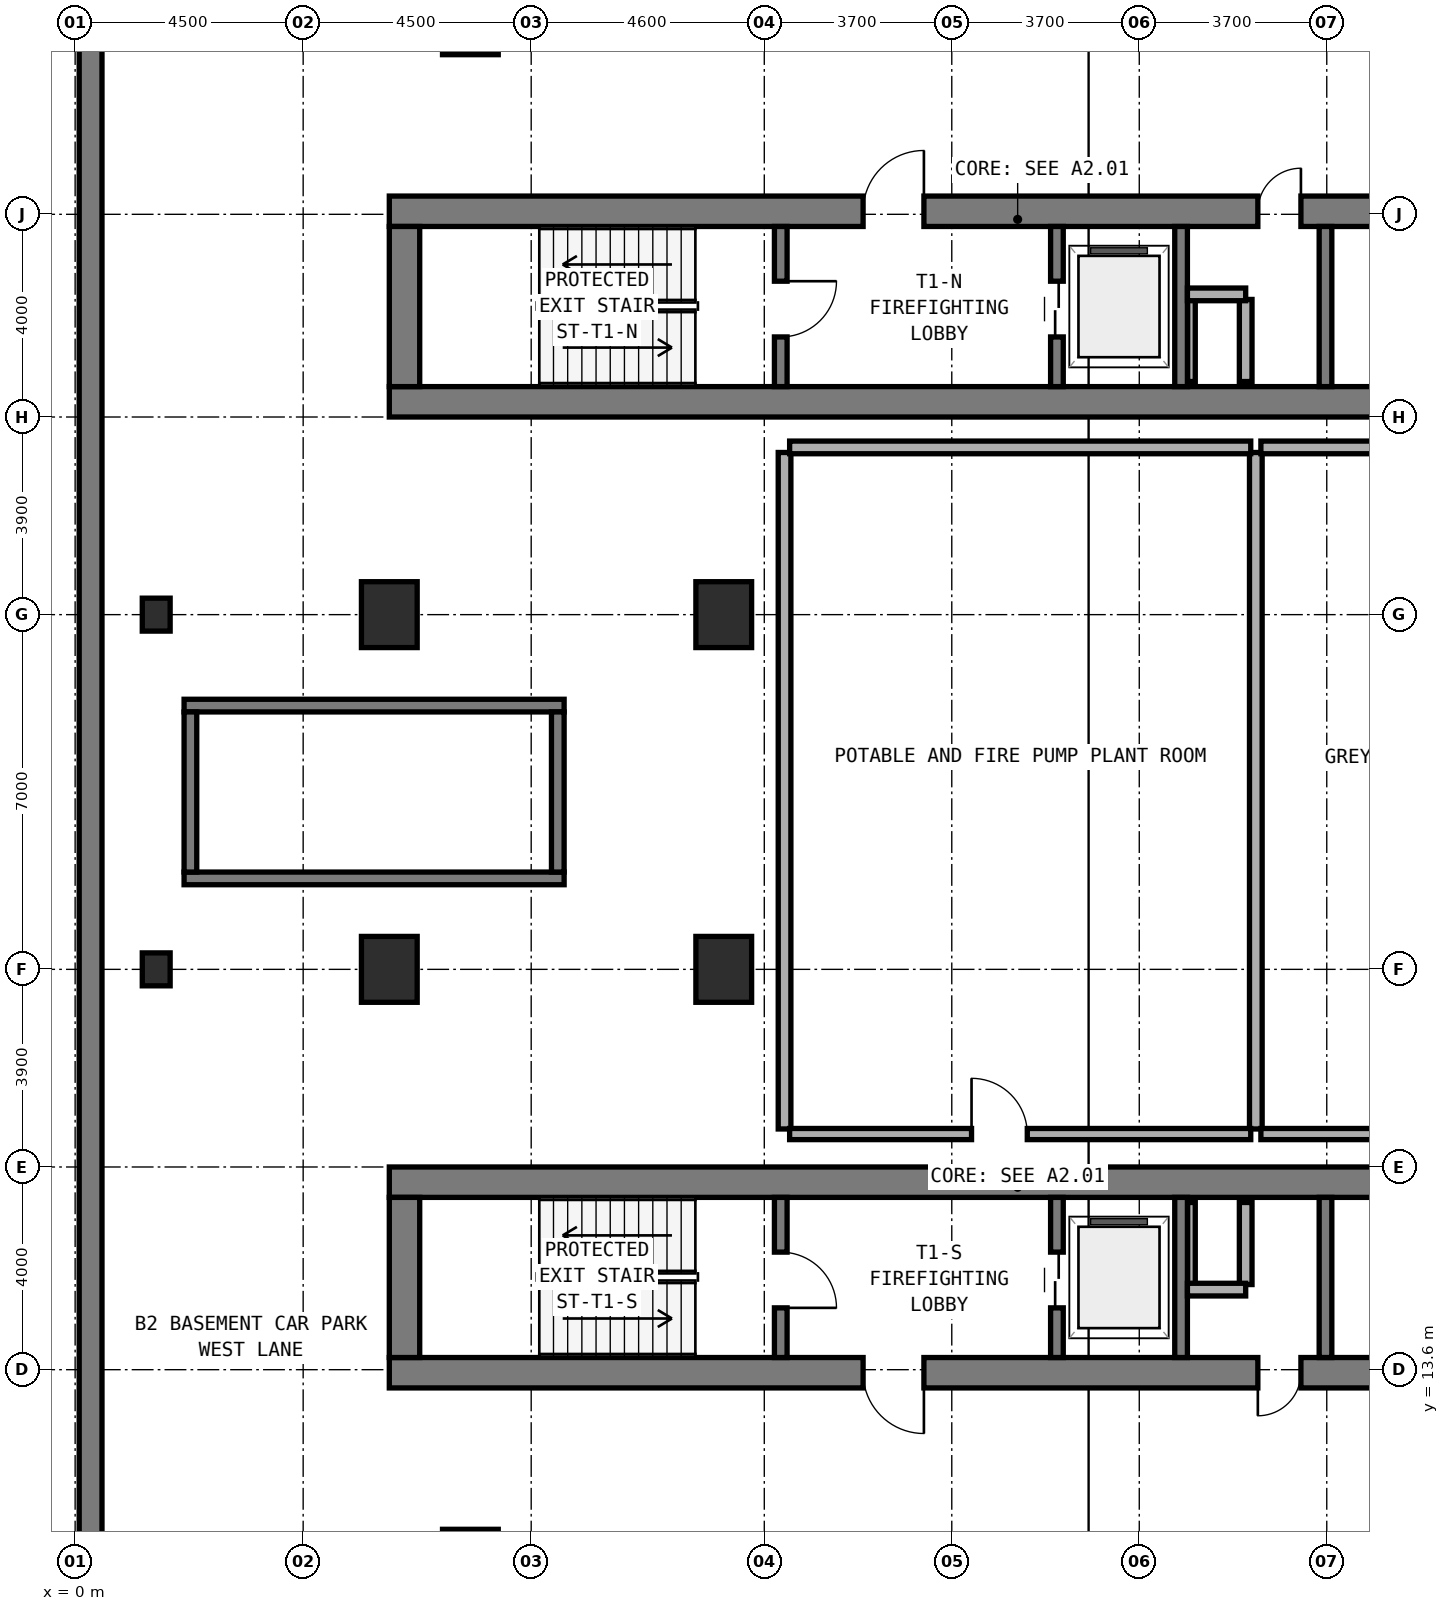
"""IFC4 building model, lengths in metres.
Left out: names, types, materials, properties, quantities, classifications, styles, units other than length and angle.
Written with IfcOpenShell. Run it as: python <this file> out.ifc"""

import sys

from ifc_helpers import new_model, si_unit, direction, frame, frame_2d, origin, origin_2d, place, context, subcontext, project, spatial, rectangle, extrude, element, fill, save


model = new_model("IFC4")
c1 = context("Model", 3, precision=1e-05, world=origin(), true_north=direction((0.0, 1.0)))
c2 = subcontext(c1, "Body", "Model", "MODEL_VIEW")
j1 = project(units=[si_unit("LENGTHUNIT", "METRE"), si_unit("PLANEANGLEUNIT", "RADIAN")], contexts=[c1])
p1 = place(None, origin())
s1 = spatial("IfcSite", under=j1, at=p1, CompositionType="ELEMENT")
p2 = place(p1, origin())
s2 = spatial("IfcBuilding", under=s1, at=p2, CompositionType="ELEMENT")
p3 = place(p2, frame((0.0, 0.0, -8.4)))
s3 = spatial("IfcBuildingStorey", under=s2, at=p3, CompositionType="ELEMENT", Elevation=-8.4)
p4 = place(p3, frame((0.305, 49.47, 0.0), z_axis=(0.0, 0.0, 1.0), x_axis=(0.0, -1.0, 0.0)))
e1 = element("IfcWall", 1, at=p4, inside=s3, PredefinedType="USERDEFINED", context=c2, shape_type="SweptSolid", body=[
    extrude(rectangle(XDim=48.94, YDim=0.45, at=frame_2d((24.47, 0.0))), origin(), (0.0, 0.0, 1.0), 4.2),
])
p5 = place(p3, frame((6.2, 32.7, 0.0), z_axis=(0.0, 0.0, 1.0), x_axis=(1.0, 0.0, 0.0)))
e2 = element("IfcWall", 2, at=p5, inside=s3, PredefinedType="SHEAR", context=c2, shape_type="SweptSolid", body=[
    extrude(rectangle(XDim=24.8, YDim=0.6, at=frame_2d((12.4, 0.0))), origin(), (0.0, 0.0, 1.0), 4.2),
])
p6 = place(p3, frame((6.2, 36.46, 0.0), z_axis=(0.0, 0.0, 1.0), x_axis=(1.0, 0.0, 0.0)))
e3 = element("IfcWall", 3, at=p6, inside=s3, PredefinedType="SHEAR", context=c2, shape_type="SweptSolid", body=[
    extrude(rectangle(XDim=24.8, YDim=0.6, at=frame_2d((12.4, 0.0))), origin(), (0.0, 0.0, 1.0), 4.2),
])
p7 = place(p6, frame((9.35, 0.0, 0.0)))
e4 = element("IfcOpeningElement", 4, at=p7, cuts=e3, PredefinedType="OPENING", context=c2, shape_type="SweptSolid", body=[
    extrude(rectangle(XDim=1.2, YDim=2.15, at=frame_2d((0.6, 1.075))), frame((0.0, 0.31, 0.0), z_axis=(0.0, -1.0, 0.0), x_axis=(1.0, 0.0, 0.0)), (0.0, 0.0, 1.0), 0.62),
])
p8 = place(p6, frame((17.14, 0.0, 0.0)))
e5 = element("IfcOpeningElement", 5, at=p8, cuts=e3, PredefinedType="OPENING", context=c2, shape_type="SweptSolid", body=[
    extrude(rectangle(XDim=0.85, YDim=2.1, at=frame_2d((0.425, 1.05))), frame((0.0, 0.31, 0.0), z_axis=(0.0, -1.0, 0.0), x_axis=(1.0, 0.0, 0.0)), (0.0, 0.0, 1.0), 0.62),
])
p9 = place(p3, frame((6.5, 33.0, 0.0), z_axis=(0.0, 0.0, 1.0), x_axis=(0.0, 1.0, 0.0)))
e6 = element("IfcWall", 6, at=p9, inside=s3, PredefinedType="SHEAR", context=c2, shape_type="SweptSolid", body=[
    extrude(rectangle(XDim=3.16, YDim=0.6, at=frame_2d((1.58, 0.0))), origin(), (0.0, 0.0, 1.0), 4.2),
])
p10 = place(p3, frame((13.925, 33.0, 0.0), z_axis=(0.0, 0.0, 1.0), x_axis=(0.0, 1.0, 0.0)))
e7 = element("IfcWall", 7, at=p10, inside=s3, PredefinedType="STANDARD", context=c2, shape_type="SweptSolid", body=[
    extrude(rectangle(XDim=3.16, YDim=0.25, at=frame_2d((1.58, 0.0))), origin(), (0.0, 0.0, 1.0), 3.88),
])
p11 = place(p10, frame((0.98, 0.0, 0.0)))
e8 = element("IfcOpeningElement", 8, at=p11, cuts=e7, PredefinedType="OPENING", context=c2, shape_type="SweptSolid", body=[
    extrude(rectangle(XDim=1.1, YDim=2.15, at=frame_2d((0.55, 1.075))), frame((0.0, 0.135, 0.0), z_axis=(0.0, -1.0, 0.0), x_axis=(1.0, 0.0, 0.0)), (0.0, 0.0, 1.0), 0.27),
])
p12 = place(p3, frame((19.375, 33.0, 0.0), z_axis=(0.0, 0.0, 1.0), x_axis=(0.0, 1.0, 0.0)))
e9 = element("IfcWall", 9, at=p12, inside=s3, PredefinedType="STANDARD", context=c2, shape_type="SweptSolid", body=[
    extrude(rectangle(XDim=3.16, YDim=0.25, at=frame_2d((1.58, 0.0))), origin(), (0.0, 0.0, 1.0), 3.88),
])
p13 = place(p12, frame((0.98, 0.0, 0.0)))
e10 = element("IfcOpeningElement", 10, at=p13, cuts=e9, PredefinedType="OPENING", context=c2, shape_type="SweptSolid", body=[
    extrude(rectangle(XDim=1.1, YDim=2.15, at=frame_2d((0.55, 1.075))), frame((0.0, 0.135, 0.0), z_axis=(0.0, -1.0, 0.0), x_axis=(1.0, 0.0, 0.0)), (0.0, 0.0, 1.0), 0.27),
])
for number, where, z_axis, x_axis in (
    (11, (21.825, 33.0, 0.0), (0.0, 0.0, 1.0), (0.0, 1.0, 0.0)),
    (12, (24.675, 33.0, 0.0), (0.0, 0.0, 1.0), (0.0, 1.0, 0.0)),
):
    element("IfcWall", number, at=place(p3, frame(where, z_axis=z_axis, x_axis=x_axis)), inside=s3, PredefinedType="STANDARD", context=c2, shape_type="SweptSolid", body=[
        extrude(rectangle(XDim=3.16, YDim=0.25, at=frame_2d((1.58, 0.0))), origin(), (0.0, 0.0, 1.0), 3.88),
    ])
p14 = place(p3, frame((6.2, 13.54, 0.0), z_axis=(0.0, 0.0, 1.0), x_axis=(1.0, 0.0, 0.0)))
e13 = element("IfcWall", 13, at=p14, inside=s3, PredefinedType="SHEAR", context=c2, shape_type="SweptSolid", body=[
    extrude(rectangle(XDim=24.8, YDim=0.6, at=frame_2d((12.4, 0.0))), origin(), (0.0, 0.0, 1.0), 4.2),
])
p15 = place(p14, frame((9.35, 0.0, 0.0)))
e14 = element("IfcOpeningElement", 14, at=p15, cuts=e13, PredefinedType="OPENING", context=c2, shape_type="SweptSolid", body=[
    extrude(rectangle(XDim=1.2, YDim=2.15, at=frame_2d((0.6, 1.075))), frame((0.0, 0.31, 0.0), z_axis=(0.0, -1.0, 0.0), x_axis=(1.0, 0.0, 0.0)), (0.0, 0.0, 1.0), 0.62),
])
p16 = place(p14, frame((17.14, 0.0, 0.0)))
e15 = element("IfcOpeningElement", 15, at=p16, cuts=e13, PredefinedType="OPENING", context=c2, shape_type="SweptSolid", body=[
    extrude(rectangle(XDim=0.85, YDim=2.1, at=frame_2d((0.425, 1.05))), frame((0.0, 0.31, 0.0), z_axis=(0.0, -1.0, 0.0), x_axis=(1.0, 0.0, 0.0)), (0.0, 0.0, 1.0), 0.62),
])
p17 = place(p3, frame((6.2, 17.3, 0.0), z_axis=(0.0, 0.0, 1.0), x_axis=(1.0, 0.0, 0.0)))
e16 = element("IfcWall", 16, at=p17, inside=s3, PredefinedType="SHEAR", context=c2, shape_type="SweptSolid", body=[
    extrude(rectangle(XDim=24.8, YDim=0.6, at=frame_2d((12.4, 0.0))), origin(), (0.0, 0.0, 1.0), 4.2),
])
p18 = place(p3, frame((6.5, 13.84, 0.0), z_axis=(0.0, 0.0, 1.0), x_axis=(0.0, 1.0, 0.0)))
e17 = element("IfcWall", 17, at=p18, inside=s3, PredefinedType="SHEAR", context=c2, shape_type="SweptSolid", body=[
    extrude(rectangle(XDim=3.16, YDim=0.6, at=frame_2d((1.58, 0.0))), origin(), (0.0, 0.0, 1.0), 4.2),
])
p19 = place(p3, frame((13.925, 13.84, 0.0), z_axis=(0.0, 0.0, 1.0), x_axis=(0.0, 1.0, 0.0)))
e18 = element("IfcWall", 18, at=p19, inside=s3, PredefinedType="STANDARD", context=c2, shape_type="SweptSolid", body=[
    extrude(rectangle(XDim=3.16, YDim=0.25, at=frame_2d((1.58, 0.0))), origin(), (0.0, 0.0, 1.0), 3.88),
])
p20 = place(p19, frame((0.98, 0.0, 0.0)))
e19 = element("IfcOpeningElement", 19, at=p20, cuts=e18, PredefinedType="OPENING", context=c2, shape_type="SweptSolid", body=[
    extrude(rectangle(XDim=1.1, YDim=2.15, at=frame_2d((0.55, 1.075))), frame((0.0, 0.135, 0.0), z_axis=(0.0, -1.0, 0.0), x_axis=(1.0, 0.0, 0.0)), (0.0, 0.0, 1.0), 0.27),
])
p21 = place(p3, frame((19.375, 13.84, 0.0), z_axis=(0.0, 0.0, 1.0), x_axis=(0.0, 1.0, 0.0)))
e20 = element("IfcWall", 20, at=p21, inside=s3, PredefinedType="STANDARD", context=c2, shape_type="SweptSolid", body=[
    extrude(rectangle(XDim=3.16, YDim=0.25, at=frame_2d((1.58, 0.0))), origin(), (0.0, 0.0, 1.0), 3.88),
])
p22 = place(p21, frame((0.98, 0.0, 0.0)))
e21 = element("IfcOpeningElement", 21, at=p22, cuts=e20, PredefinedType="OPENING", context=c2, shape_type="SweptSolid", body=[
    extrude(rectangle(XDim=1.1, YDim=2.15, at=frame_2d((0.55, 1.075))), frame((0.0, 0.135, 0.0), z_axis=(0.0, -1.0, 0.0), x_axis=(1.0, 0.0, 0.0)), (0.0, 0.0, 1.0), 0.27),
])
for number, where, z_axis, x_axis in (
    (22, (21.825, 13.84, 0.0), (0.0, 0.0, 1.0), (0.0, 1.0, 0.0)),
    (23, (24.675, 13.84, 0.0), (0.0, 0.0, 1.0), (0.0, 1.0, 0.0)),
):
    element("IfcWall", number, at=place(p3, frame(where, z_axis=z_axis, x_axis=x_axis)), inside=s3, PredefinedType="STANDARD", context=c2, shape_type="SweptSolid", body=[
        extrude(rectangle(XDim=3.16, YDim=0.25, at=frame_2d((1.58, 0.0))), origin(), (0.0, 0.0, 1.0), 3.88),
    ])
for number, where, z_axis, x_axis in (
    (24, (2.15, 23.295, 0.0), (0.0, 0.0, 1.0), (1.0, 0.0, 0.0)),
    (25, (2.15, 26.705, 0.0), (0.0, 0.0, 1.0), (1.0, 0.0, 0.0)),
):
    element("IfcWall", number, at=place(p3, frame(where, z_axis=z_axis, x_axis=x_axis)), inside=s3, PredefinedType="STANDARD", context=c2, shape_type="SweptSolid", body=[
        extrude(rectangle(XDim=7.5, YDim=0.25, at=frame_2d((3.75, 0.0))), origin(), (0.0, 0.0, 1.0), 4.2),
    ])
for number, where, z_axis, x_axis in (
    (26, (2.275, 23.42, 0.0), (0.0, 0.0, 1.0), (0.0, 1.0, 0.0)),
    (27, (9.525, 23.42, 0.0), (0.0, 0.0, 1.0), (0.0, 1.0, 0.0)),
):
    element("IfcWall", number, at=place(p3, frame(where, z_axis=z_axis, x_axis=x_axis)), inside=s3, PredefinedType="STANDARD", context=c2, shape_type="SweptSolid", body=[
        extrude(rectangle(XDim=3.16, YDim=0.25, at=frame_2d((1.58, 0.0))), origin(), (0.0, 0.0, 1.0), 4.2),
    ])
for number, where, z_axis, x_axis in (
    (28, (6.2, 21.5, 0.0), (0.0, 0.0, 1.0), (1.0, 0.0, 0.0)),
    (29, (6.2, 28.5, 0.0), (0.0, 0.0, 1.0), (1.0, 0.0, 0.0)),
    (30, (7.8, 9.8, 0.0), (0.0, 0.0, 1.0), (1.0, 0.0, 0.0)),
    (31, (7.8, 40.2, 0.0), (0.0, 0.0, 1.0), (1.0, 0.0, 0.0)),
    (32, (12.8, 21.5, 0.0), (0.0, 0.0, 1.0), (1.0, 0.0, 0.0)),
    (33, (12.8, 28.5, 0.0), (0.0, 0.0, 1.0), (1.0, 0.0, 0.0)),
):
    element("IfcColumn", number, at=place(p3, frame(where, z_axis=z_axis, x_axis=x_axis)), inside=s3, PredefinedType="COLUMN", context=c2, shape_type="SweptSolid", body=[
        extrude(rectangle(XDim=1.1, YDim=1.3, at=origin_2d()), origin(), (0.0, 0.0, 1.0), 4.2),
    ])
for number, where, z_axis, x_axis in (
    (34, (1.6, 21.5, 0.0), (0.0, 0.0, 1.0), (1.0, 0.0, 0.0)),
    (35, (1.6, 28.5, 0.0), (0.0, 0.0, 1.0), (1.0, 0.0, 0.0)),
):
    element("IfcColumn", number, at=place(p3, frame(where, z_axis=z_axis, x_axis=x_axis)), inside=s3, PredefinedType="PILASTER", context=c2, shape_type="SweptSolid", body=[
        extrude(rectangle(XDim=0.55, YDim=0.65, at=origin_2d()), origin(), (0.0, 0.0, 1.0), 4.2),
    ])
p23 = place(p3, frame((22.03, 33.1, 0.0), z_axis=(0.0, 0.0, 1.0), x_axis=(0.0, 1.0, 0.0)))
e36 = element("IfcWall", 36, at=p23, inside=s3, PredefinedType="PARTITIONING", context=c2, shape_type="SweptSolid", body=[
    extrude(rectangle(XDim=1.62, YDim=0.15, at=frame_2d((0.81, 0.0))), origin(), (0.0, 0.0, 1.0), 3.88),
])
p24 = place(p3, frame((23.1, 33.1, 0.0), z_axis=(0.0, 0.0, 1.0), x_axis=(0.0, 1.0, 0.0)))
e37 = element("IfcWall", 37, at=p24, inside=s3, PredefinedType="SOLIDWALL", context=c2, shape_type="SweptSolid", body=[
    extrude(rectangle(XDim=1.62, YDim=0.25, at=frame_2d((0.81, 0.0))), origin(), (0.0, 0.0, 1.0), 3.88),
])
p25 = place(p3, frame((21.95, 34.82, 0.0), z_axis=(0.0, 0.0, 1.0), x_axis=(1.0, 0.0, 0.0)))
e38 = element("IfcWall", 38, at=p25, inside=s3, PredefinedType="SOLIDWALL", context=c2, shape_type="SweptSolid", body=[
    extrude(rectangle(XDim=1.15, YDim=0.25, at=frame_2d((0.575, 0.0))), origin(), (0.0, 0.0, 1.0), 3.88),
])
p26 = place(p3, frame((22.03, 15.28, 0.0), z_axis=(0.0, 0.0, 1.0), x_axis=(0.0, 1.0, 0.0)))
e39 = element("IfcWall", 39, at=p26, inside=s3, PredefinedType="PARTITIONING", context=c2, shape_type="SweptSolid", body=[
    extrude(rectangle(XDim=1.62, YDim=0.15, at=frame_2d((0.81, 0.0))), origin(), (0.0, 0.0, 1.0), 3.88),
])
p27 = place(p3, frame((23.1, 15.28, 0.0), z_axis=(0.0, 0.0, 1.0), x_axis=(0.0, 1.0, 0.0)))
e40 = element("IfcWall", 40, at=p27, inside=s3, PredefinedType="SOLIDWALL", context=c2, shape_type="SweptSolid", body=[
    extrude(rectangle(XDim=1.62, YDim=0.25, at=frame_2d((0.81, 0.0))), origin(), (0.0, 0.0, 1.0), 3.88),
])
p28 = place(p3, frame((21.95, 15.18, 0.0), z_axis=(0.0, 0.0, 1.0), x_axis=(1.0, 0.0, 0.0)))
e41 = element("IfcWall", 41, at=p28, inside=s3, PredefinedType="SOLIDWALL", context=c2, shape_type="SweptSolid", body=[
    extrude(rectangle(XDim=1.15, YDim=0.25, at=frame_2d((0.575, 0.0))), origin(), (0.0, 0.0, 1.0), 3.88),
])
for number, where, z_axis, x_axis in (
    (42, (14.0, 18.35, 0.0), (0.0, 0.0, 1.0), (0.0, 1.0, 0.0)),
    (43, (23.3, 18.35, 0.0), (0.0, 0.0, 1.0), (0.0, 1.0, 0.0)),
):
    element("IfcWall", number, at=place(p3, frame(where, z_axis=z_axis, x_axis=x_axis)), inside=s3, PredefinedType="SOLIDWALL", context=c2, shape_type="SweptSolid", body=[
        extrude(rectangle(XDim=13.35, YDim=0.25, at=frame_2d((6.675, 0.0))), origin(), (0.0, 0.0, 1.0), 3.055),
    ])
p29 = place(p3, frame((14.1, 31.8, 0.0), z_axis=(0.0, 0.0, 1.0), x_axis=(1.0, 0.0, 0.0)))
e44 = element("IfcWall", 44, at=p29, inside=s3, PredefinedType="SOLIDWALL", context=c2, shape_type="SweptSolid", body=[
    extrude(rectangle(XDim=9.1, YDim=0.25, at=frame_2d((4.55, 0.0))), origin(), (0.0, 0.0, 1.0), 3.88),
])
p30 = place(p3, frame((14.1, 18.25, 0.0), z_axis=(0.0, 0.0, 1.0), x_axis=(1.0, 0.0, 0.0)))
e45 = element("IfcWall", 45, at=p30, inside=s3, PredefinedType="SOLIDWALL", context=c2, shape_type="SweptSolid", body=[
    extrude(rectangle(XDim=9.1, YDim=0.22, at=frame_2d((4.55, 0.0))), origin(), (0.0, 0.0, 1.0), 3.88),
])
p31 = place(p30, frame((3.59, 0.0, 0.0)))
e46 = element("IfcOpeningElement", 46, at=p31, cuts=e45, PredefinedType="OPENING", context=c2, shape_type="SweptSolid", body=[
    extrude(rectangle(XDim=1.1, YDim=2.1, at=frame_2d((0.55, 1.05))), frame((0.0, 0.12, 0.0), z_axis=(0.0, -1.0, 0.0), x_axis=(1.0, 0.0, 0.0)), (0.0, 0.0, 1.0), 0.24),
])
p32 = place(p3, frame((23.4, 31.8, 0.0), z_axis=(0.0, 0.0, 1.0), x_axis=(1.0, 0.0, 0.0)))
e47 = element("IfcWall", 47, at=p32, inside=s3, PredefinedType="SOLIDWALL", context=c2, shape_type="SweptSolid", body=[
    extrude(rectangle(XDim=9.4, YDim=0.25, at=frame_2d((4.7, 0.0))), origin(), (0.0, 0.0, 1.0), 2.955),
])
p33 = place(p3, frame((23.4, 18.25, 0.0), z_axis=(0.0, 0.0, 1.0), x_axis=(1.0, 0.0, 0.0)))
e48 = element("IfcWall", 48, at=p33, inside=s3, PredefinedType="SOLIDWALL", context=c2, shape_type="SweptSolid", body=[
    extrude(rectangle(XDim=9.4, YDim=0.22, at=frame_2d((4.7, 0.0))), origin(), (0.0, 0.0, 1.0), 2.955),
])
p34 = place(p33, frame((7.725, 0.0, 0.0)))
e49 = element("IfcOpeningElement", 49, at=p34, cuts=e48, PredefinedType="OPENING", context=c2, shape_type="SweptSolid", body=[
    extrude(rectangle(XDim=1.1, YDim=2.1, at=frame_2d((0.55, 1.05))), frame((0.0, 0.12, 0.0), z_axis=(0.0, -1.0, 0.0), x_axis=(1.0, 0.0, 0.0)), (0.0, 0.0, 1.0), 0.24),
])
p35 = place(p11, frame((1.1, 0.0, 0.0), z_axis=(0.0, 0.0, 1.0), x_axis=(-1.0, 0.0, 0.0)))
e50 = element("IfcDoor", 50, at=p35, inside=s3, OperationType="SINGLE_SWING_LEFT", PredefinedType="DOOR", context=c2, shape_type="SweptSolid", body=[
    extrude(rectangle(XDim=1.1, YDim=2.15, at=frame_2d((0.55, 1.075))), frame((0.0, 0.025, 0.0), z_axis=(0.0, -1.0, 0.0), x_axis=(1.0, 0.0, 0.0)), (0.0, 0.0, 1.0), 0.05),
])
fill(e8, e50)
p36 = place(p7, origin())
e51 = element("IfcDoor", 51, at=p36, inside=s3, OperationType="SINGLE_SWING_RIGHT", PredefinedType="DOOR", context=c2, shape_type="SweptSolid", body=[
    extrude(rectangle(XDim=1.2, YDim=2.15, at=frame_2d((0.6, 1.075))), frame((0.0, 0.025, 0.0), z_axis=(0.0, -1.0, 0.0), x_axis=(1.0, 0.0, 0.0)), (0.0, 0.0, 1.0), 0.05),
])
fill(e4, e51)
p37 = place(p13, origin())
e52 = element("IfcDoor", 52, at=p37, inside=s3, OperationType="DOUBLE_DOOR_SLIDING", PredefinedType="DOOR", context=c2, shape_type="SweptSolid", body=[
    extrude(rectangle(XDim=1.1, YDim=2.15, at=frame_2d((0.55, 1.075))), frame((0.0, 0.025, 0.0), z_axis=(0.0, -1.0, 0.0), x_axis=(1.0, 0.0, 0.0)), (0.0, 0.0, 1.0), 0.05),
])
fill(e10, e52)
p38 = place(p8, origin())
e53 = element("IfcDoor", 53, at=p38, inside=s3, OperationType="SINGLE_SWING_RIGHT", PredefinedType="DOOR", context=c2, shape_type="SweptSolid", body=[
    extrude(rectangle(XDim=0.85, YDim=2.1, at=frame_2d((0.425, 1.05))), frame((0.0, 0.025, 0.0), z_axis=(0.0, -1.0, 0.0), x_axis=(1.0, 0.0, 0.0)), (0.0, 0.0, 1.0), 0.05),
])
fill(e5, e53)
p39 = place(p20, frame((1.1, 0.0, 0.0), z_axis=(0.0, 0.0, 1.0), x_axis=(-1.0, 0.0, 0.0)))
e54 = element("IfcDoor", 54, at=p39, inside=s3, OperationType="SINGLE_SWING_RIGHT", PredefinedType="DOOR", context=c2, shape_type="SweptSolid", body=[
    extrude(rectangle(XDim=1.1, YDim=2.15, at=frame_2d((0.55, 1.075))), frame((0.0, 0.025, 0.0), z_axis=(0.0, -1.0, 0.0), x_axis=(1.0, 0.0, 0.0)), (0.0, 0.0, 1.0), 0.05),
])
fill(e19, e54)
p40 = place(p15, frame((1.2, 0.0, 0.0), z_axis=(0.0, 0.0, 1.0), x_axis=(-1.0, 0.0, 0.0)))
e55 = element("IfcDoor", 55, at=p40, inside=s3, OperationType="SINGLE_SWING_LEFT", PredefinedType="DOOR", context=c2, shape_type="SweptSolid", body=[
    extrude(rectangle(XDim=1.2, YDim=2.15, at=frame_2d((0.6, 1.075))), frame((0.0, 0.025, 0.0), z_axis=(0.0, -1.0, 0.0), x_axis=(1.0, 0.0, 0.0)), (0.0, 0.0, 1.0), 0.05),
])
fill(e14, e55)
p41 = place(p22, origin())
e56 = element("IfcDoor", 56, at=p41, inside=s3, OperationType="DOUBLE_DOOR_SLIDING", PredefinedType="DOOR", context=c2, shape_type="SweptSolid", body=[
    extrude(rectangle(XDim=1.1, YDim=2.15, at=frame_2d((0.55, 1.075))), frame((0.0, 0.025, 0.0), z_axis=(0.0, -1.0, 0.0), x_axis=(1.0, 0.0, 0.0)), (0.0, 0.0, 1.0), 0.05),
])
fill(e21, e56)
p42 = place(p16, frame((0.85, 0.0, 0.0), z_axis=(0.0, 0.0, 1.0), x_axis=(-1.0, 0.0, 0.0)))
e57 = element("IfcDoor", 57, at=p42, inside=s3, OperationType="SINGLE_SWING_RIGHT", PredefinedType="DOOR", context=c2, shape_type="SweptSolid", body=[
    extrude(rectangle(XDim=0.85, YDim=2.1, at=frame_2d((0.425, 1.05))), frame((0.0, 0.025, 0.0), z_axis=(0.0, -1.0, 0.0), x_axis=(1.0, 0.0, 0.0)), (0.0, 0.0, 1.0), 0.05),
])
fill(e15, e57)
p43 = place(p31, origin())
e58 = element("IfcDoor", 58, at=p43, inside=s3, OperationType="SINGLE_SWING_LEFT", PredefinedType="DOOR", context=c2, shape_type="SweptSolid", body=[
    extrude(rectangle(XDim=1.1, YDim=2.1, at=frame_2d((0.55, 1.05))), frame((0.0, 0.025, 0.0), z_axis=(0.0, -1.0, 0.0), x_axis=(1.0, 0.0, 0.0)), (0.0, 0.0, 1.0), 0.05),
])
fill(e46, e58)
save(model, sys.argv[1])
